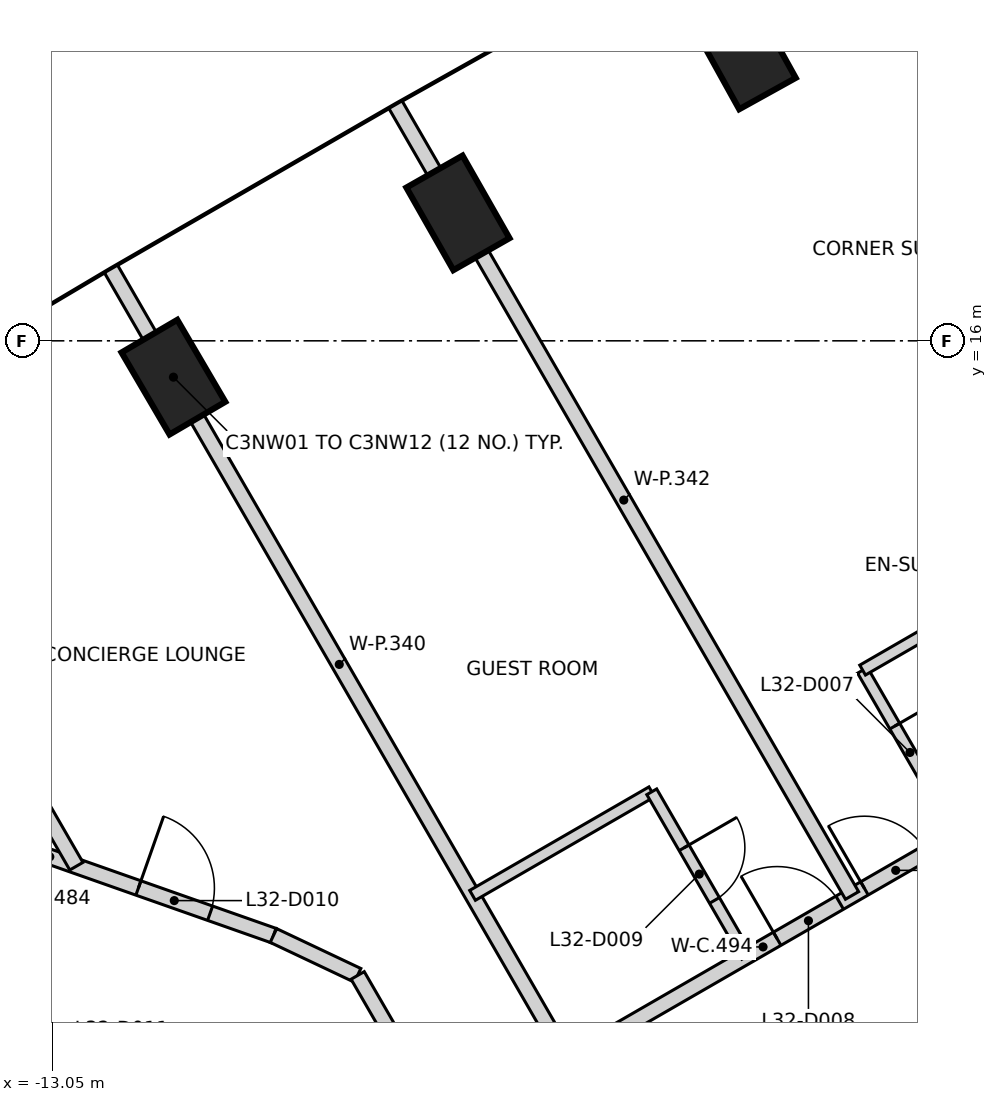
"""IFC4 building model, lengths in metres.
Left out: names, types, materials, properties, quantities, classifications, styles, units other than length and angle.
Written with IfcOpenShell. Run it as: python <this file> out.ifc"""

import sys

from ifc_helpers import new_model, si_unit, direction, frame, frame_2d, origin, origin_2d, place, context, subcontext, project, spatial, rectangle, extrude, element, fill, save


model = new_model("IFC4")
c1 = context("Model", 3, precision=1e-05, world=origin(), true_north=direction((0.0, 1.0)))
c2 = subcontext(c1, "Body", "Model", "MODEL_VIEW")
j1 = project(units=[si_unit("LENGTHUNIT", "METRE"), si_unit("PLANEANGLEUNIT", "RADIAN")], contexts=[c1])
p1 = place(None, origin())
s1 = spatial("IfcSite", under=j1, at=p1, CompositionType="ELEMENT")
p2 = place(p1, origin())
s2 = spatial("IfcBuilding", under=s1, at=p2, CompositionType="ELEMENT")
p3 = place(p2, frame((0.0, 0.0, 132.4)))
s3 = spatial("IfcBuildingStorey", under=s2, at=p3, CompositionType="ELEMENT", Elevation=132.4)
for number, where, z_axis, x_axis in (
    (1, (-3.945, 19.8, -0.4), (0.0, 0.0, 1.0), (-0.485, 0.875, 0.0)),
    (2, (-7.714, 17.683, -0.4), (0.0, 0.0, 1.0), (-0.495, 0.869, 0.0)),
    (3, (-11.457, 15.522, -0.4), (0.0, 0.0, 1.0), (-0.505, 0.863, 0.0)),
):
    element("IfcColumn", number, at=place(p3, frame(where, z_axis=z_axis, x_axis=x_axis)), inside=s3, PredefinedType="COLUMN", context=c2, shape_type="SweptSolid", body=[
        extrude(rectangle(XDim=1.25, YDim=0.85, at=origin_2d()), origin(), (0.0, 0.0, 1.0), 3.6),
    ])
p4 = place(p3, frame((-16.402, 7.879, 0.0), z_axis=(0.0, 0.0, 1.0), x_axis=(0.944492255471, -0.328533680702, 0.0)))
e4 = element("IfcWall", 4, at=p4, inside=s3, PredefinedType="PARTITIONING", context=c2, shape_type="SweptSolid", body=[
    extrude(rectangle(XDim=5.802, YDim=0.2, at=frame_2d((2.901, 0.0))), origin(), (0.0, 0.0, 1.0), 3.2),
])
p5 = place(p4, frame((2.37, 0.0, 0.0)))
e5 = element("IfcOpeningElement", 5, at=p5, cuts=e4, PredefinedType="OPENING", context=c2, shape_type="SweptSolid", body=[
    extrude(rectangle(XDim=1.0, YDim=2.1, at=frame_2d((0.5, 1.05))), frame((0.0, 0.11, 0.0), z_axis=(0.0, -1.0, 0.0), x_axis=(1.0, 0.0, 0.0)), (0.0, 0.0, 1.0), 0.22),
])
p6 = place(p3, frame((-16.026, 10.248, 0.0), z_axis=(0.0, 0.0, 1.0), x_axis=(0.943234993827, -0.332126100179, 0.0)))
e6 = element("IfcWall", 6, at=p6, inside=s3, PredefinedType="PARTITIONING", context=c2, shape_type="SweptSolid", body=[
    extrude(rectangle(XDim=6.239, YDim=0.2, at=frame_2d((3.119, 0.0))), origin(), (0.0, 0.0, 1.0), 3.2),
])
p7 = place(p6, frame((4.355, 0.0, 0.0)))
e7 = element("IfcOpeningElement", 7, at=p7, cuts=e6, PredefinedType="OPENING", context=c2, shape_type="SweptSolid", body=[
    extrude(rectangle(XDim=1.0, YDim=2.1, at=frame_2d((0.5, 1.05))), frame((0.0, 0.11, 0.0), z_axis=(0.0, -1.0, 0.0), x_axis=(1.0, 0.0, 0.0)), (0.0, 0.0, 1.0), 0.22),
])
p8 = place(p6, frame((1.251, 0.0, 0.0)))
e8 = element("IfcOpeningElement", 8, at=p8, cuts=e6, PredefinedType="OPENING", context=c2, shape_type="SweptSolid", body=[
    extrude(rectangle(XDim=1.0, YDim=2.1, at=frame_2d((0.5, 1.05))), frame((0.0, 0.11, 0.0), z_axis=(0.0, -1.0, 0.0), x_axis=(1.0, 0.0, 0.0)), (0.0, 0.0, 1.0), 0.22),
])
p9 = place(p3, frame((-10.141, 8.176, 0.0), z_axis=(0.0, 0.0, 1.0), x_axis=(0.903904169039, -0.427735026849, 0.0)))
e9 = element("IfcWall", 9, at=p9, inside=s3, PredefinedType="PARTITIONING", context=c2, shape_type="SweptSolid", body=[
    extrude(rectangle(XDim=1.225, YDim=0.2, at=frame_2d((0.612, 0.0))), origin(), (0.0, 0.0, 1.0), 3.2),
])
p10 = place(p3, frame((-9.033, 7.651, 0.0), z_axis=(0.0, 0.0, 1.0), x_axis=(0.500354010599, -0.865820919173, 0.0)))
e10 = element("IfcWall", 10, at=p10, inside=s3, PredefinedType="PARTITIONING", context=c2, shape_type="SweptSolid", body=[
    extrude(rectangle(XDim=2.342, YDim=0.2, at=frame_2d((1.171, 0.0))), origin(), (0.0, 0.0, 1.0), 3.2),
])
p11 = place(p3, frame((-8.613, 2.881, 0.0), z_axis=(0.0, 0.0, 1.0), x_axis=(0.866103179807, 0.499865263774, 0.0)))
e11 = element("IfcWall", 11, at=p11, inside=s3, PredefinedType="PARTITIONING", context=c2, shape_type="SweptSolid", body=[
    extrude(rectangle(XDim=12.036, YDim=0.2, at=frame_2d((6.018, 0.0))), origin(), (0.0, 0.0, 1.0), 3.2),
])
p12 = place(p11, frame((9.652, 0.0, 0.0)))
e12 = element("IfcOpeningElement", 12, at=p12, cuts=e11, PredefinedType="OPENING", context=c2, shape_type="SweptSolid", body=[
    extrude(rectangle(XDim=0.9, YDim=2.1, at=frame_2d((0.45, 1.05))), frame((0.0, 0.11, 0.0), z_axis=(0.0, -1.0, 0.0), x_axis=(1.0, 0.0, 0.0)), (0.0, 0.0, 1.0), 0.22),
])
p13 = place(p11, frame((3.646, 0.0, 0.0)))
e13 = element("IfcOpeningElement", 13, at=p13, cuts=e11, PredefinedType="OPENING", context=c2, shape_type="SweptSolid", body=[
    extrude(rectangle(XDim=0.9, YDim=2.1, at=frame_2d((0.45, 1.05))), frame((0.0, 0.11, 0.0), z_axis=(0.0, -1.0, 0.0), x_axis=(1.0, 0.0, 0.0)), (0.0, 0.0, 1.0), 0.22),
])
p14 = place(p3, frame((-7.862, 5.624, 0.0), z_axis=(0.0, 0.0, 1.0), x_axis=(0.866109024618, 0.499855136491, 0.0)))
e14 = element("IfcWall", 14, at=p14, inside=s3, PredefinedType="PARTITIONING", context=c2, shape_type="SweptSolid", body=[
    extrude(rectangle(XDim=9.61, YDim=0.2, at=frame_2d((4.805, 0.0))), origin(), (0.0, 0.0, 1.0), 3.2),
])
p15 = place(p14, frame((6.345, 0.0, 0.0)))
e15 = element("IfcOpeningElement", 15, at=p15, cuts=e14, PredefinedType="OPENING", context=c2, shape_type="SweptSolid", body=[
    extrude(rectangle(XDim=0.95, YDim=2.1, at=frame_2d((0.475, 1.05))), frame((0.0, 0.11, 0.0), z_axis=(0.0, -1.0, 0.0), x_axis=(1.0, 0.0, 0.0)), (0.0, 0.0, 1.0), 0.22),
])
p16 = place(p14, frame((5.02, 0.0, 0.0)))
e16 = element("IfcOpeningElement", 16, at=p16, cuts=e14, PredefinedType="OPENING", context=c2, shape_type="SweptSolid", body=[
    extrude(rectangle(XDim=0.95, YDim=2.1, at=frame_2d((0.475, 1.05))), frame((0.0, 0.11, 0.0), z_axis=(0.0, -1.0, 0.0), x_axis=(1.0, 0.0, 0.0)), (0.0, 0.0, 1.0), 0.22),
])
p17 = place(p3, frame((-15.996, 14.74, 0.0), z_axis=(0.0, 0.0, 1.0), x_axis=(0.499925398456, -0.866068470722, 0.0)))
e17 = element("IfcWall", 17, at=p17, inside=s3, PredefinedType="PARTITIONING", context=c2, shape_type="SweptSolid", body=[
    extrude(rectangle(XDim=6.526, YDim=0.2, at=frame_2d((3.263, 0.0))), origin(), (0.0, 0.0, 1.0), 3.2),
])
p18 = place(p3, frame((-12.279, 16.946, 0.0), z_axis=(0.0, 0.0, 1.0), x_axis=(0.499902454835, -0.866081714187, 0.0)))
e18 = element("IfcWall", 18, at=p18, inside=s3, PredefinedType="PARTITIONING", context=c2, shape_type="SweptSolid", body=[
    extrude(rectangle(XDim=12.015, YDim=0.2, at=frame_2d((6.008, 0.0))), origin(), (0.0, 0.0, 1.0), 3.2),
])
p19 = place(p3, frame((-8.535, 19.107, 0.0), z_axis=(0.0, 0.0, 1.0), x_axis=(0.499972843048, -0.86604108229, 0.0)))
e19 = element("IfcWall", 19, at=p19, inside=s3, PredefinedType="PARTITIONING", context=c2, shape_type="SweptSolid", body=[
    extrude(rectangle(XDim=12.013, YDim=0.2, at=frame_2d((6.007, 0.0))), origin(), (0.0, 0.0, 1.0), 3.2),
])
p20 = place(p3, frame((-8.0, 0.924, 0.0), z_axis=(0.0, 0.0, 1.0), x_axis=(0.86604129137, 0.499972480886, 0.0)))
e20 = element("IfcWall", 20, at=p20, inside=s3, PredefinedType="PARTITIONING", context=c2, shape_type="SweptSolid", body=[
    extrude(rectangle(XDim=12.932, YDim=0.2, at=frame_2d((6.466, 0.0))), origin(), (0.0, 0.0, 1.0), 2.3),
])
p21 = place(p3, frame((-7.522, 8.704, 0.0), z_axis=(0.0, 0.0, 1.0), x_axis=(0.865972067821, 0.500092369221, 0.0)))
e21 = element("IfcWall", 21, at=p21, inside=s3, PredefinedType="PARTITIONING", context=c2, shape_type="SweptSolid", body=[
    extrude(rectangle(XDim=2.723, YDim=0.15, at=frame_2d((1.362, 0.0))), origin(), (0.0, 0.0, 1.0), 3.2),
])
p22 = place(p3, frame((-5.164, 10.067, 0.0), z_axis=(0.0, 0.0, 1.0), x_axis=(0.500046524342, -0.865998541277, 0.0)))
e22 = element("IfcWall", 22, at=p22, inside=s3, PredefinedType="PARTITIONING", context=c2, shape_type="SweptSolid", body=[
    extrude(rectangle(XDim=2.5, YDim=0.15, at=frame_2d((1.25, 0.0))), origin(), (0.0, 0.0, 1.0), 3.2),
])
p23 = place(p22, frame((0.85, 0.0, 0.0)))
e23 = element("IfcOpeningElement", 23, at=p23, cuts=e22, PredefinedType="OPENING", context=c2, shape_type="SweptSolid", body=[
    extrude(rectangle(XDim=0.8, YDim=2.1, at=frame_2d((0.4, 1.05))), frame((0.0, 0.085, 0.0), z_axis=(0.0, -1.0, 0.0), x_axis=(1.0, 0.0, 0.0)), (0.0, 0.0, 1.0), 0.17),
])
p24 = place(p3, frame((-2.391, 11.665, 0.0), z_axis=(0.0, 0.0, 1.0), x_axis=(0.500049599607, -0.865996765544, 0.0)))
e24 = element("IfcWall", 24, at=p24, inside=s3, PredefinedType="PARTITIONING", context=c2, shape_type="SweptSolid", body=[
    extrude(rectangle(XDim=2.498, YDim=0.15, at=frame_2d((1.249, 0.0))), origin(), (0.0, 0.0, 1.0), 3.2),
])
p25 = place(p24, frame((0.848, 0.0, 0.0)))
e25 = element("IfcOpeningElement", 25, at=p25, cuts=e24, PredefinedType="OPENING", context=c2, shape_type="SweptSolid", body=[
    extrude(rectangle(XDim=0.8, YDim=2.1, at=frame_2d((0.4, 1.05))), frame((0.0, 0.085, 0.0), z_axis=(0.0, -1.0, 0.0), x_axis=(1.0, 0.0, 0.0)), (0.0, 0.0, 1.0), 0.17),
])
p26 = place(p3, frame((-2.39, 11.668, 0.0), z_axis=(0.0, 0.0, 1.0), x_axis=(0.865932482239, 0.500160910312, 0.0)))
e26 = element("IfcWall", 26, at=p26, inside=s3, PredefinedType="PARTITIONING", context=c2, shape_type="SweptSolid", body=[
    extrude(rectangle(XDim=1.848, YDim=0.15, at=frame_2d((0.924, 0.0))), origin(), (0.0, 0.0, 1.0), 3.2),
])
p27 = place(p15, origin())
e27 = element("IfcDoor", 27, at=p27, inside=s3, OperationType="SINGLE_SWING_LEFT", PredefinedType="DOOR", context=c2, shape_type="SweptSolid", body=[
    extrude(rectangle(XDim=0.95, YDim=2.1, at=frame_2d((0.475, 1.05))), frame((0.0, 0.025, 0.0), z_axis=(0.0, -1.0, 0.0), x_axis=(1.0, 0.0, 0.0)), (0.0, 0.0, 1.0), 0.05),
])
fill(e15, e27)
p28 = place(p25, origin())
e28 = element("IfcDoor", 28, at=p28, inside=s3, OperationType="SINGLE_SWING_LEFT", PredefinedType="DOOR", context=c2, shape_type="SweptSolid", body=[
    extrude(rectangle(XDim=0.8, YDim=2.1, at=frame_2d((0.4, 1.05))), frame((0.0, 0.025, 0.0), z_axis=(0.0, -1.0, 0.0), x_axis=(1.0, 0.0, 0.0)), (0.0, 0.0, 1.0), 0.05),
])
fill(e25, e28)
p29 = place(p16, origin())
e29 = element("IfcDoor", 29, at=p29, inside=s3, OperationType="SINGLE_SWING_LEFT", PredefinedType="DOOR", context=c2, shape_type="SweptSolid", body=[
    extrude(rectangle(XDim=0.95, YDim=2.1, at=frame_2d((0.475, 1.05))), frame((0.0, 0.025, 0.0), z_axis=(0.0, -1.0, 0.0), x_axis=(1.0, 0.0, 0.0)), (0.0, 0.0, 1.0), 0.05),
])
fill(e16, e29)
p30 = place(p23, frame((0.8, 0.0, 0.0), z_axis=(0.0, 0.0, 1.0), x_axis=(-1.0, 0.0, 0.0)))
e30 = element("IfcDoor", 30, at=p30, inside=s3, OperationType="SINGLE_SWING_LEFT", PredefinedType="DOOR", context=c2, shape_type="SweptSolid", body=[
    extrude(rectangle(XDim=0.8, YDim=2.1, at=frame_2d((0.4, 1.05))), frame((0.0, 0.025, 0.0), z_axis=(0.0, -1.0, 0.0), x_axis=(1.0, 0.0, 0.0)), (0.0, 0.0, 1.0), 0.05),
])
fill(e23, e30)
p31 = place(p7, origin())
e31 = element("IfcDoor", 31, at=p31, inside=s3, OperationType="SINGLE_SWING_LEFT", PredefinedType="DOOR", context=c2, shape_type="SweptSolid", body=[
    extrude(rectangle(XDim=1.0, YDim=2.1, at=frame_2d((0.5, 1.05))), frame((0.0, 0.025, 0.0), z_axis=(0.0, -1.0, 0.0), x_axis=(1.0, 0.0, 0.0)), (0.0, 0.0, 1.0), 0.05),
])
fill(e7, e31)
save(model, sys.argv[1])
